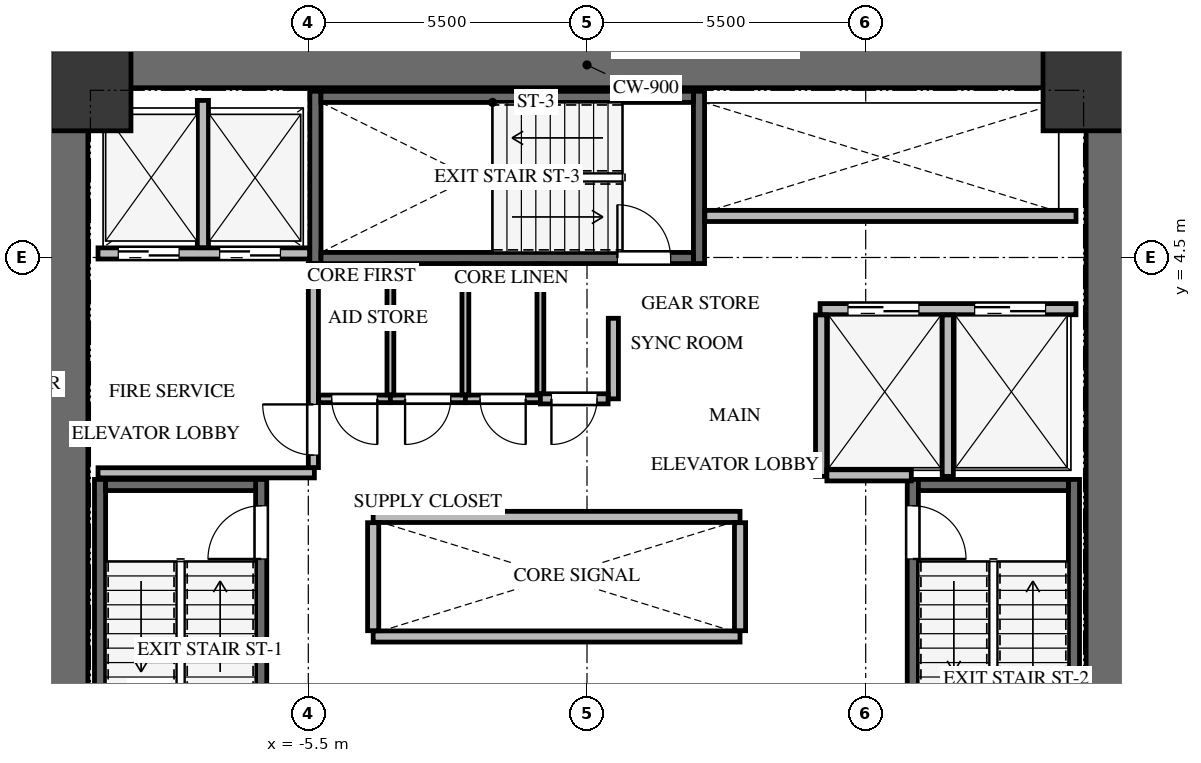
"""IFC4 building model, lengths in metres.
Left out: names, types, materials, properties, quantities, classifications, styles, units other than length and angle.
Written with IfcOpenShell. Run it as: python <this file> out.ifc"""

import sys

from ifc_helpers import new_model, si_unit, direction, frame, frame_2d, origin, origin_2d, place, context, subcontext, project, spatial, rectangle, extrude, source, transform, mapped, element, fill, save


model = new_model("IFC4")
c1 = context("Model", 3, precision=1e-05, world=origin(), true_north=direction((0.0, 1.0)))
c2 = subcontext(c1, "Body", "Model", "MODEL_VIEW")
j1 = project(units=[si_unit("LENGTHUNIT", "METRE"), si_unit("PLANEANGLEUNIT", "RADIAN")], contexts=[c1])
p1 = place(None, origin())
s1 = spatial("IfcSite", under=j1, at=p1, CompositionType="ELEMENT")
p2 = place(p1, origin())
s2 = spatial("IfcBuilding", under=s1, at=p2, CompositionType="ELEMENT")
p3 = place(p2, frame((0.0, 0.0, 42.3)))
s3 = spatial("IfcBuildingStorey", under=s2, at=p3, CompositionType="ELEMENT", Elevation=42.3)
for number, where, z_axis, x_axis in (
    (1, (-10.3, -8.75, 0.0), (0.0, 0.0, 1.0), (0.0, 1.0, 0.0)),
    (2, (10.3, -8.75, 0.0), (0.0, 0.0, 1.0), (0.0, 1.0, 0.0)),
):
    element("IfcWall", number, at=place(p3, frame(where, z_axis=z_axis, x_axis=x_axis)), inside=s3, PredefinedType="SHEAR", context=c2, shape_type="SweptSolid", body=[
        extrude(rectangle(XDim=17.5, YDim=0.9, at=frame_2d((8.75, 0.0))), origin(), (0.0, 0.0, 1.0), 3.3),
    ])
p4 = place(p3, frame((-9.85, 8.3, 0.0), z_axis=(0.0, 0.0, 1.0), x_axis=(1.0, 0.0, 0.0)))
e3 = element("IfcWall", 3, at=p4, inside=s3, PredefinedType="SHEAR", context=c2, shape_type="SweptSolid", body=[
    extrude(rectangle(XDim=19.7, YDim=0.9, at=frame_2d((9.85, 0.0))), origin(), (0.0, 0.0, 1.0), 3.3),
])
p5 = place(p3, frame((-6.43, -7.77, -0.24), z_axis=(0.0, 0.0, 1.0), x_axis=(0.0, 1.0, 0.0)))
e4 = element("IfcWall", 4, at=p5, inside=s3, PredefinedType="SHEAR", context=c2, shape_type="SweptSolid", body=[
    extrude(rectangle(XDim=7.89, YDim=0.22, at=frame_2d((3.945, 0.0))), origin(), (0.0, 0.0, 1.0), 3.3),
])
p6 = place(p5, frame((6.32, 0.0, 0.0)))
e5 = element("IfcOpeningElement", 5, at=p6, cuts=e4, PredefinedType="OPENING", context=c2, shape_type="SweptSolid", body=[
    extrude(rectangle(XDim=1.05, YDim=2.15, at=frame_2d((0.525, 1.075))), frame((0.0, 0.12, 0.0), z_axis=(0.0, -1.0, 0.0), x_axis=(1.0, 0.0, 0.0)), (0.0, 0.0, 1.0), 0.24),
])
p7 = place(p3, frame((-9.61, 0.12, -0.24), z_axis=(0.0, 0.0, 1.0), x_axis=(0.0, -1.0, 0.0)))
e6 = element("IfcWall", 6, at=p7, inside=s3, PredefinedType="SHEAR", context=c2, shape_type="SweptSolid", body=[
    extrude(rectangle(XDim=7.89, YDim=0.22, at=frame_2d((3.945, 0.0))), origin(), (0.0, 0.0, 1.0), 3.3),
])
p8 = place(p3, frame((-6.54, 0.01, -0.24), z_axis=(0.0, 0.0, 1.0), x_axis=(-1.0, 0.0, 0.0)))
e7 = element("IfcWall", 7, at=p8, inside=s3, PredefinedType="SHEAR", context=c2, shape_type="SweptSolid", body=[
    extrude(rectangle(XDim=2.96, YDim=0.22, at=frame_2d((1.48, 0.0))), origin(), (0.0, 0.0, 1.0), 3.3),
])
p9 = place(p3, frame((9.61, -7.77, -0.24), z_axis=(0.0, 0.0, 1.0), x_axis=(0.0, 1.0, 0.0)))
e8 = element("IfcWall", 8, at=p9, inside=s3, PredefinedType="SHEAR", context=c2, shape_type="SweptSolid", body=[
    extrude(rectangle(XDim=7.89, YDim=0.22, at=frame_2d((3.945, 0.0))), origin(), (0.0, 0.0, 1.0), 3.3),
])
p10 = place(p3, frame((6.43, 0.12, -0.24), z_axis=(0.0, 0.0, 1.0), x_axis=(0.0, -1.0, 0.0)))
e9 = element("IfcWall", 9, at=p10, inside=s3, PredefinedType="SHEAR", context=c2, shape_type="SweptSolid", body=[
    extrude(rectangle(XDim=7.89, YDim=0.22, at=frame_2d((3.945, 0.0))), origin(), (0.0, 0.0, 1.0), 3.3),
])
p11 = place(p10, frame((0.52, 0.0, 0.0)))
e10 = element("IfcOpeningElement", 10, at=p11, cuts=e9, PredefinedType="OPENING", context=c2, shape_type="SweptSolid", body=[
    extrude(rectangle(XDim=1.05, YDim=2.15, at=frame_2d((0.525, 1.075))), frame((0.0, 0.12, 0.0), z_axis=(0.0, -1.0, 0.0), x_axis=(1.0, 0.0, 0.0)), (0.0, 0.0, 1.0), 0.24),
])
p12 = place(p3, frame((9.5, 0.01, -0.24), z_axis=(0.0, 0.0, 1.0), x_axis=(-1.0, 0.0, 0.0)))
e11 = element("IfcWall", 11, at=p12, inside=s3, PredefinedType="SHEAR", context=c2, shape_type="SweptSolid", body=[
    extrude(rectangle(XDim=2.96, YDim=0.22, at=frame_2d((1.48, 0.0))), origin(), (0.0, 0.0, 1.0), 3.3),
])
for number, where, z_axis, x_axis in (
    (12, (2.21, 4.38, -0.24), (0.0, 0.0, 1.0), (0.0, 1.0, 0.0)),
    (13, (-5.36, 7.78, -0.24), (0.0, 0.0, 1.0), (0.0, -1.0, 0.0)),
):
    element("IfcWall", number, at=place(p3, frame(where, z_axis=z_axis, x_axis=x_axis)), inside=s3, PredefinedType="SHEAR", context=c2, shape_type="SweptSolid", body=[
        extrude(rectangle(XDim=3.4, YDim=0.22, at=frame_2d((1.7, 0.0))), origin(), (0.0, 0.0, 1.0), 3.3),
    ])
p13 = place(p3, frame((-5.25, 4.49, -0.24), z_axis=(0.0, 0.0, 1.0), x_axis=(1.0, 0.0, 0.0)))
e14 = element("IfcWall", 14, at=p13, inside=s3, PredefinedType="SHEAR", context=c2, shape_type="SweptSolid", body=[
    extrude(rectangle(XDim=7.35, YDim=0.22, at=frame_2d((3.675, 0.0))), origin(), (0.0, 0.0, 1.0), 3.3),
])
p14 = place(p13, frame((5.85, 0.0, 0.0)))
e15 = element("IfcOpeningElement", 15, at=p14, cuts=e14, PredefinedType="OPENING", context=c2, shape_type="SweptSolid", body=[
    extrude(rectangle(XDim=1.05, YDim=2.15, at=frame_2d((0.525, 1.075))), frame((0.0, 0.12, 0.0), z_axis=(0.0, -1.0, 0.0), x_axis=(1.0, 0.0, 0.0)), (0.0, 0.0, 1.0), 0.24),
])
p15 = place(p3, frame((2.1, 7.67, -0.24), z_axis=(0.0, 0.0, 1.0), x_axis=(-1.0, 0.0, 0.0)))
e16 = element("IfcWall", 16, at=p15, inside=s3, PredefinedType="SHEAR", context=c2, shape_type="SweptSolid", body=[
    extrude(rectangle(XDim=7.35, YDim=0.22, at=frame_2d((3.675, 0.0))), origin(), (0.0, 0.0, 1.0), 3.3),
])
m1 = source(origin(), c2, "Body", "SweptSolid", [
    extrude(rectangle(XDim=1.6, YDim=1.6, at=origin_2d()), origin(), (0.0, 0.0, 1.0), 3.3),
])
for number, where, z_axis, x_axis in (
    (17, (9.8, 7.8, -0.24), (0.0, 0.0, 1.0), (1.0, 0.0, 0.0)),
    (18, (-9.8, 7.8, -0.24), (0.0, 0.0, 1.0), (1.0, 0.0, 0.0)),
):
    element("IfcColumn", number, at=place(p3, frame(where, z_axis=z_axis, x_axis=x_axis)), inside=s3, PredefinedType="COLUMN", context=c2, shape_type="MappedRepresentation", body=[
        mapped(m1, transform((0.0, 0.0, 0.0), x_axis=(1.0, 0.0, 0.0), y_axis=(0.0, 1.0, 0.0), z_axis=(0.0, 0.0, 1.0), scale=1.0)),
    ])
p16 = place(p3, frame((-9.65, 4.58, 0.0), z_axis=(0.0, 0.0, 1.0), x_axis=(1.0, 0.0, 0.0)))
e19 = element("IfcWall", 19, at=p16, inside=s3, PredefinedType="SOLIDWALL", context=c2, shape_type="SweptSolid", body=[
    extrude(rectangle(XDim=4.175, YDim=0.22, at=frame_2d((2.087, 0.0))), origin(), (0.0, 0.0, 1.0), 3.045),
])
p17 = place(p16, frame((0.4, 0.0, 0.0)))
e20 = element("IfcOpeningElement", 20, at=p17, cuts=e19, PredefinedType="OPENING", context=c2, shape_type="SweptSolid", body=[
    extrude(rectangle(XDim=1.2, YDim=2.15, at=frame_2d((0.6, 1.075))), frame((0.0, 0.12, 0.0), z_axis=(0.0, -1.0, 0.0), x_axis=(1.0, 0.0, 0.0)), (0.0, 0.0, 1.0), 0.24),
])
p18 = place(p16, frame((2.4, 0.0, 0.0)))
e21 = element("IfcOpeningElement", 21, at=p18, cuts=e19, PredefinedType="OPENING", context=c2, shape_type="SweptSolid", body=[
    extrude(rectangle(XDim=1.2, YDim=2.15, at=frame_2d((0.6, 1.075))), frame((0.0, 0.12, 0.0), z_axis=(0.0, -1.0, 0.0), x_axis=(1.0, 0.0, 0.0)), (0.0, 0.0, 1.0), 0.24),
])
p19 = place(p3, frame((-7.58, 4.694, 0.0), z_axis=(0.0, 0.0, 1.0), x_axis=(0.0, 1.0, 0.0)))
e22 = element("IfcWall", 22, at=p19, inside=s3, PredefinedType="SOLIDWALL", context=c2, shape_type="SweptSolid", body=[
    extrude(rectangle(XDim=2.906, YDim=0.22, at=frame_2d((1.453, 0.0))), origin(), (0.0, 0.0, 1.0), 3.045),
])
p20 = place(p3, frame((-9.65, 0.25, 0.0), z_axis=(0.0, 0.0, 1.0), x_axis=(1.0, 0.0, 0.0)))
e23 = element("IfcWall", 23, at=p20, inside=s3, PredefinedType="SOLIDWALL", context=c2, shape_type="SweptSolid", body=[
    extrude(rectangle(XDim=4.27, YDim=0.2, at=frame_2d((2.135, 0.0))), origin(), (0.0, 0.0, 1.0), 3.045),
])
p21 = place(p3, frame((-5.4, 0.354, 0.0), z_axis=(0.0, 0.0, 1.0), x_axis=(0.0, 1.0, 0.0)))
e24 = element("IfcWall", 24, at=p21, inside=s3, PredefinedType="SOLIDWALL", context=c2, shape_type="SweptSolid", body=[
    extrude(rectangle(XDim=4.026, YDim=0.2, at=frame_2d((2.013, 0.0))), origin(), (0.0, 0.0, 1.0), 3.045),
])
p22 = place(p21, frame((0.246, 0.0, 0.0)))
e25 = element("IfcOpeningElement", 25, at=p22, cuts=e24, PredefinedType="OPENING", context=c2, shape_type="SweptSolid", body=[
    extrude(rectangle(XDim=1.0, YDim=2.15, at=frame_2d((0.5, 1.075))), frame((0.0, 0.11, 0.0), z_axis=(0.0, -1.0, 0.0), x_axis=(1.0, 0.0, 0.0)), (0.0, 0.0, 1.0), 0.22),
])
p23 = place(p3, frame((4.6, 3.48, 0.0), z_axis=(0.0, 0.0, 1.0), x_axis=(1.0, 0.0, 0.0)))
e26 = element("IfcWall", 26, at=p23, inside=s3, PredefinedType="SOLIDWALL", context=c2, shape_type="SweptSolid", body=[
    extrude(rectangle(XDim=5.05, YDim=0.22, at=frame_2d((2.525, 0.0))), origin(), (0.0, 0.0, 1.0), 3.045),
])
p24 = place(p23, frame((0.55, 0.0, 0.0)))
e27 = element("IfcOpeningElement", 27, at=p24, cuts=e26, PredefinedType="OPENING", context=c2, shape_type="SweptSolid", body=[
    extrude(rectangle(XDim=1.4, YDim=2.15, at=frame_2d((0.7, 1.075))), frame((0.0, 0.12, 0.0), z_axis=(0.0, -1.0, 0.0), x_axis=(1.0, 0.0, 0.0)), (0.0, 0.0, 1.0), 0.24),
])
p25 = place(p23, frame((3.05, 0.0, 0.0)))
e28 = element("IfcOpeningElement", 28, at=p25, cuts=e26, PredefinedType="OPENING", context=c2, shape_type="SweptSolid", body=[
    extrude(rectangle(XDim=1.4, YDim=2.15, at=frame_2d((0.7, 1.075))), frame((0.0, 0.12, 0.0), z_axis=(0.0, -1.0, 0.0), x_axis=(1.0, 0.0, 0.0)), (0.0, 0.0, 1.0), 0.24),
])
for number, where, z_axis, x_axis in (
    (29, (4.62, 0.18, 0.0), (0.0, 0.0, 1.0), (0.0, 1.0, 0.0)),
    (30, (7.12, 0.18, 0.0), (0.0, 0.0, 1.0), (0.0, 1.0, 0.0)),
):
    element("IfcWall", number, at=place(p3, frame(where, z_axis=z_axis, x_axis=x_axis)), inside=s3, PredefinedType="SOLIDWALL", context=c2, shape_type="SweptSolid", body=[
        extrude(rectangle(XDim=3.186, YDim=0.22, at=frame_2d((1.593, 0.0))), origin(), (0.0, 0.0, 1.0), 3.045),
    ])
p26 = place(p3, frame((4.734, 0.2, 0.0), z_axis=(0.0, 0.0, 1.0), x_axis=(1.0, 0.0, 0.0)))
e31 = element("IfcWall", 31, at=p26, inside=s3, PredefinedType="SOLIDWALL", context=c2, shape_type="SweptSolid", body=[
    extrude(rectangle(XDim=1.666, YDim=0.22, at=frame_2d((0.833, 0.0))), origin(), (0.0, 0.0, 1.0), 3.045),
])
for number, where, z_axis, x_axis in (
    (32, (-4.22, -2.98, 0.0), (0.0, 0.0, 1.0), (1.0, 0.0, 0.0)),
    (33, (-4.22, -0.62, 0.0), (0.0, 0.0, 1.0), (1.0, 0.0, 0.0)),
):
    element("IfcWall", number, at=place(p3, frame(where, z_axis=z_axis, x_axis=x_axis)), inside=s3, PredefinedType="SOLIDWALL", context=c2, shape_type="SweptSolid", body=[
        extrude(rectangle(XDim=7.24, YDim=0.22, at=frame_2d((3.62, 0.0))), origin(), (0.0, 0.0, 1.0), 3.045),
    ])
for number, where, z_axis, x_axis in (
    (34, (-4.22, -2.866, 0.0), (0.0, 0.0, 1.0), (0.0, 1.0, 0.0)),
    (35, (3.02, -2.866, 0.0), (0.0, 0.0, 1.0), (0.0, 1.0, 0.0)),
):
    element("IfcWall", number, at=place(p3, frame(where, z_axis=z_axis, x_axis=x_axis)), inside=s3, PredefinedType="SOLIDWALL", context=c2, shape_type="SweptSolid", body=[
        extrude(rectangle(XDim=2.132, YDim=0.22, at=frame_2d((1.066, 0.0))), origin(), (0.0, 0.0, 1.0), 3.045),
    ])
p27 = place(p3, frame((2.325, 5.32, 0.0), z_axis=(0.0, 0.0, 1.0), x_axis=(1.0, 0.0, 0.0)))
e36 = element("IfcWall", 36, at=p27, inside=s3, PredefinedType="SOLIDWALL", context=c2, shape_type="SweptSolid", body=[
    extrude(rectangle(XDim=7.325, YDim=0.22, at=frame_2d((3.663, 0.0))), origin(), (0.0, 0.0, 1.0), 3.045),
])
p28 = place(p3, frame((-3.88, 1.71, 0.0), z_axis=(0.0, 0.0, 1.0), x_axis=(-1.0, 0.0, 0.0)))
e37 = element("IfcWall", 37, at=p28, inside=s3, PredefinedType="PARTITIONING", context=c2, shape_type="SweptSolid", body=[
    extrude(rectangle(XDim=1.416, YDim=0.15, at=frame_2d((0.708, 0.0))), origin(), (0.0, 0.0, 1.0), 3.045),
])
p29 = place(p28, frame((0.258, 0.0, 0.0)))
e38 = element("IfcOpeningElement", 38, at=p29, cuts=e37, PredefinedType="OPENING", context=c2, shape_type="SweptSolid", body=[
    extrude(rectangle(XDim=0.9, YDim=2.05, at=frame_2d((0.45, 1.025))), frame((0.0, 0.085, 0.0), z_axis=(0.0, -1.0, 0.0), x_axis=(1.0, 0.0, 0.0)), (0.0, 0.0, 1.0), 0.17),
])
p30 = place(p3, frame((-2.4, 1.71, 0.0), z_axis=(0.0, 0.0, 1.0), x_axis=(-1.0, 0.0, 0.0)))
e39 = element("IfcWall", 39, at=p30, inside=s3, PredefinedType="PARTITIONING", context=c2, shape_type="SweptSolid", body=[
    extrude(rectangle(XDim=1.48, YDim=0.15, at=frame_2d((0.74, 0.0))), origin(), (0.0, 0.0, 1.0), 3.045),
])
p31 = place(p30, frame((0.29, 0.0, 0.0)))
e40 = element("IfcOpeningElement", 40, at=p31, cuts=e39, PredefinedType="OPENING", context=c2, shape_type="SweptSolid", body=[
    extrude(rectangle(XDim=0.9, YDim=2.05, at=frame_2d((0.45, 1.025))), frame((0.0, 0.085, 0.0), z_axis=(0.0, -1.0, 0.0), x_axis=(1.0, 0.0, 0.0)), (0.0, 0.0, 1.0), 0.17),
])
p32 = place(p3, frame((-0.92, 1.71, 0.0), z_axis=(0.0, 0.0, 1.0), x_axis=(-1.0, 0.0, 0.0)))
e41 = element("IfcWall", 41, at=p32, inside=s3, PredefinedType="PARTITIONING", context=c2, shape_type="SweptSolid", body=[
    extrude(rectangle(XDim=1.48, YDim=0.15, at=frame_2d((0.74, 0.0))), origin(), (0.0, 0.0, 1.0), 3.045),
])
p33 = place(p32, frame((0.29, 0.0, 0.0)))
e42 = element("IfcOpeningElement", 42, at=p33, cuts=e41, PredefinedType="OPENING", context=c2, shape_type="SweptSolid", body=[
    extrude(rectangle(XDim=0.9, YDim=2.05, at=frame_2d((0.45, 1.025))), frame((0.0, 0.085, 0.0), z_axis=(0.0, -1.0, 0.0), x_axis=(1.0, 0.0, 0.0)), (0.0, 0.0, 1.0), 0.17),
])
p34 = place(p3, frame((0.52, 3.3, 0.0), z_axis=(0.0, 0.0, 1.0), x_axis=(0.0, -1.0, 0.0)))
e43 = element("IfcWall", 43, at=p34, inside=s3, PredefinedType="SOLIDWALL", context=c2, shape_type="SweptSolid", body=[
    extrude(rectangle(XDim=1.59, YDim=0.2, at=frame_2d((0.795, 0.0))), origin(), (0.0, 0.0, 1.0), 3.045),
])
p35 = place(p3, frame((0.416, 1.71, 0.0), z_axis=(0.0, 0.0, 1.0), x_axis=(-1.0, 0.0, 0.0)))
e44 = element("IfcWall", 44, at=p35, inside=s3, PredefinedType="SOLIDWALL", context=c2, shape_type="SweptSolid", body=[
    extrude(rectangle(XDim=1.336, YDim=0.2, at=frame_2d((0.668, 0.0))), origin(), (0.0, 0.0, 1.0), 3.045),
])
p36 = place(p35, frame((0.218, 0.0, 0.0)))
e45 = element("IfcOpeningElement", 45, at=p36, cuts=e44, PredefinedType="OPENING", context=c2, shape_type="SweptSolid", body=[
    extrude(rectangle(XDim=0.9, YDim=2.05, at=frame_2d((0.45, 1.025))), frame((0.0, 0.11, 0.0), z_axis=(0.0, -1.0, 0.0), x_axis=(1.0, 0.0, 0.0)), (0.0, 0.0, 1.0), 0.22),
])
for number, where, z_axis, x_axis in (
    (46, (-3.88, 4.375, 0.0), (0.0, 0.0, 1.0), (0.0, -1.0, 0.0)),
    (47, (-2.4, 4.375, 0.0), (0.0, 0.0, 1.0), (0.0, -1.0, 0.0)),
):
    element("IfcWall", number, at=place(p3, frame(where, z_axis=z_axis, x_axis=x_axis)), inside=s3, PredefinedType="PARTITIONING", context=c2, shape_type="SweptSolid", body=[
        extrude(rectangle(XDim=2.586, YDim=0.135, at=frame_2d((1.293, 0.0))), origin(), (0.0, 0.0, 1.0), 3.045),
    ])
p37 = place(p3, frame((-0.92, 4.375, 0.0), z_axis=(0.0, 0.0, 1.0), x_axis=(0.0, -1.0, 0.0)))
e48 = element("IfcWall", 48, at=p37, inside=s3, PredefinedType="PARTITIONING", context=c2, shape_type="SweptSolid", body=[
    extrude(rectangle(XDim=2.561, YDim=0.135, at=frame_2d((1.281, 0.0))), origin(), (0.0, 0.0, 1.0), 3.045),
])
m2 = source(origin(), c2, "Body", "SweptSolid", [
    extrude(rectangle(XDim=1.05, YDim=2.15, at=frame_2d((0.525, 1.075))), frame((0.0, 0.025, 0.0), z_axis=(0.0, -1.0, 0.0), x_axis=(1.0, 0.0, 0.0)), (0.0, 0.0, 1.0), 0.05),
])
p38 = place(p6, origin())
e49 = element("IfcDoor", 49, at=p38, inside=s3, OperationType="SINGLE_SWING_LEFT", PredefinedType="DOOR", context=c2, shape_type="MappedRepresentation", body=[
    mapped(m2, transform((0.0, 0.0, 0.0), x_axis=(1.0, 0.0, 0.0), y_axis=(0.0, 1.0, 0.0), z_axis=(0.0, 0.0, 1.0), scale=1.0)),
])
fill(e5, e49)
m3 = source(origin(), c2, "Body", "SweptSolid", [
    extrude(rectangle(XDim=1.05, YDim=2.15, at=frame_2d((0.525, 1.075))), frame((0.0, 0.025, 0.0), z_axis=(0.0, -1.0, 0.0), x_axis=(1.0, 0.0, 0.0)), (0.0, 0.0, 1.0), 0.05),
])
p39 = place(p11, origin())
e50 = element("IfcDoor", 50, at=p39, inside=s3, OperationType="SINGLE_SWING_RIGHT", PredefinedType="DOOR", context=c2, shape_type="MappedRepresentation", body=[
    mapped(m3, transform((0.0, 0.0, 0.0), x_axis=(1.0, 0.0, 0.0), y_axis=(0.0, 1.0, 0.0), z_axis=(0.0, 0.0, 1.0), scale=1.0)),
])
fill(e10, e50)
p40 = place(p14, origin())
e51 = element("IfcDoor", 51, at=p40, inside=s3, OperationType="SINGLE_SWING_LEFT", PredefinedType="DOOR", context=c2, shape_type="MappedRepresentation", body=[
    mapped(m2, transform((0.0, 0.0, 0.0), x_axis=(1.0, 0.0, 0.0), y_axis=(0.0, 1.0, 0.0), z_axis=(0.0, 0.0, 1.0), scale=1.0)),
])
fill(e15, e51)
m4 = source(origin(), c2, "Body", "SweptSolid", [
    extrude(rectangle(XDim=1.2, YDim=2.15, at=frame_2d((0.6, 1.075))), frame((0.0, 0.025, 0.0), z_axis=(0.0, -1.0, 0.0), x_axis=(1.0, 0.0, 0.0)), (0.0, 0.0, 1.0), 0.05),
])
p41 = place(p17, origin())
e52 = element("IfcDoor", 52, at=p41, inside=s3, OperationType="DOUBLE_DOOR_SLIDING", PredefinedType="DOOR", context=c2, shape_type="MappedRepresentation", body=[
    mapped(m4, transform((0.0, 0.0, 0.0), x_axis=(1.0, 0.0, 0.0), y_axis=(0.0, 1.0, 0.0), z_axis=(0.0, 0.0, 1.0), scale=1.0)),
])
fill(e20, e52)
p42 = place(p18, origin())
e53 = element("IfcDoor", 53, at=p42, inside=s3, OperationType="DOUBLE_DOOR_SLIDING", PredefinedType="DOOR", context=c2, shape_type="MappedRepresentation", body=[
    mapped(m4, transform((0.0, 0.0, 0.0), x_axis=(1.0, 0.0, 0.0), y_axis=(0.0, 1.0, 0.0), z_axis=(0.0, 0.0, 1.0), scale=1.0)),
])
fill(e21, e53)
m5 = source(origin(), c2, "Body", "SweptSolid", [
    extrude(rectangle(XDim=1.0, YDim=2.15, at=frame_2d((0.5, 1.075))), frame((0.0, 0.025, 0.0), z_axis=(0.0, -1.0, 0.0), x_axis=(1.0, 0.0, 0.0)), (0.0, 0.0, 1.0), 0.05),
])
p43 = place(p22, origin())
e54 = element("IfcDoor", 54, at=p43, inside=s3, OperationType="SINGLE_SWING_RIGHT", PredefinedType="DOOR", context=c2, shape_type="MappedRepresentation", body=[
    mapped(m5, transform((0.0, 0.0, 0.0), x_axis=(1.0, 0.0, 0.0), y_axis=(0.0, 1.0, 0.0), z_axis=(0.0, 0.0, 1.0), scale=1.0)),
])
fill(e25, e54)
m6 = source(origin(), c2, "Body", "SweptSolid", [
    extrude(rectangle(XDim=1.4, YDim=2.15, at=frame_2d((0.7, 1.075))), frame((0.0, 0.025, 0.0), z_axis=(0.0, -1.0, 0.0), x_axis=(1.0, 0.0, 0.0)), (0.0, 0.0, 1.0), 0.05),
])
p44 = place(p24, origin())
e55 = element("IfcDoor", 55, at=p44, inside=s3, OperationType="DOUBLE_DOOR_SLIDING", PredefinedType="DOOR", context=c2, shape_type="MappedRepresentation", body=[
    mapped(m6, transform((0.0, 0.0, 0.0), x_axis=(1.0, 0.0, 0.0), y_axis=(0.0, 1.0, 0.0), z_axis=(0.0, 0.0, 1.0), scale=1.0)),
])
fill(e27, e55)
p45 = place(p25, origin())
e56 = element("IfcDoor", 56, at=p45, inside=s3, OperationType="DOUBLE_DOOR_SLIDING", PredefinedType="DOOR", context=c2, shape_type="MappedRepresentation", body=[
    mapped(m6, transform((0.0, 0.0, 0.0), x_axis=(1.0, 0.0, 0.0), y_axis=(0.0, 1.0, 0.0), z_axis=(0.0, 0.0, 1.0), scale=1.0)),
])
fill(e28, e56)
m7 = source(origin(), c2, "Body", "SweptSolid", [
    extrude(rectangle(XDim=0.9, YDim=2.05, at=frame_2d((0.45, 1.025))), frame((0.0, 0.025, 0.0), z_axis=(0.0, -1.0, 0.0), x_axis=(1.0, 0.0, 0.0)), (0.0, 0.0, 1.0), 0.05),
])
p46 = place(p29, origin())
e57 = element("IfcDoor", 57, at=p46, inside=s3, OperationType="SINGLE_SWING_LEFT", PredefinedType="DOOR", context=c2, shape_type="MappedRepresentation", body=[
    mapped(m7, transform((0.0, 0.0, 0.0), x_axis=(1.0, 0.0, 0.0), y_axis=(0.0, 1.0, 0.0), z_axis=(0.0, 0.0, 1.0), scale=1.0)),
])
fill(e38, e57)
m8 = source(origin(), c2, "Body", "SweptSolid", [
    extrude(rectangle(XDim=0.9, YDim=2.05, at=frame_2d((0.45, 1.025))), frame((0.0, 0.025, 0.0), z_axis=(0.0, -1.0, 0.0), x_axis=(1.0, 0.0, 0.0)), (0.0, 0.0, 1.0), 0.05),
])
p47 = place(p31, origin())
e58 = element("IfcDoor", 58, at=p47, inside=s3, OperationType="SINGLE_SWING_RIGHT", PredefinedType="DOOR", context=c2, shape_type="MappedRepresentation", body=[
    mapped(m8, transform((0.0, 0.0, 0.0), x_axis=(1.0, 0.0, 0.0), y_axis=(0.0, 1.0, 0.0), z_axis=(0.0, 0.0, 1.0), scale=1.0)),
])
fill(e40, e58)
p48 = place(p33, origin())
e59 = element("IfcDoor", 59, at=p48, inside=s3, OperationType="SINGLE_SWING_LEFT", PredefinedType="DOOR", context=c2, shape_type="MappedRepresentation", body=[
    mapped(m7, transform((0.0, 0.0, 0.0), x_axis=(1.0, 0.0, 0.0), y_axis=(0.0, 1.0, 0.0), z_axis=(0.0, 0.0, 1.0), scale=1.0)),
])
fill(e42, e59)
p49 = place(p36, origin())
e60 = element("IfcDoor", 60, at=p49, inside=s3, OperationType="SINGLE_SWING_RIGHT", PredefinedType="DOOR", context=c2, shape_type="MappedRepresentation", body=[
    mapped(m8, transform((0.0, 0.0, 0.0), x_axis=(1.0, 0.0, 0.0), y_axis=(0.0, 1.0, 0.0), z_axis=(0.0, 0.0, 1.0), scale=1.0)),
])
fill(e45, e60)
save(model, sys.argv[1])
